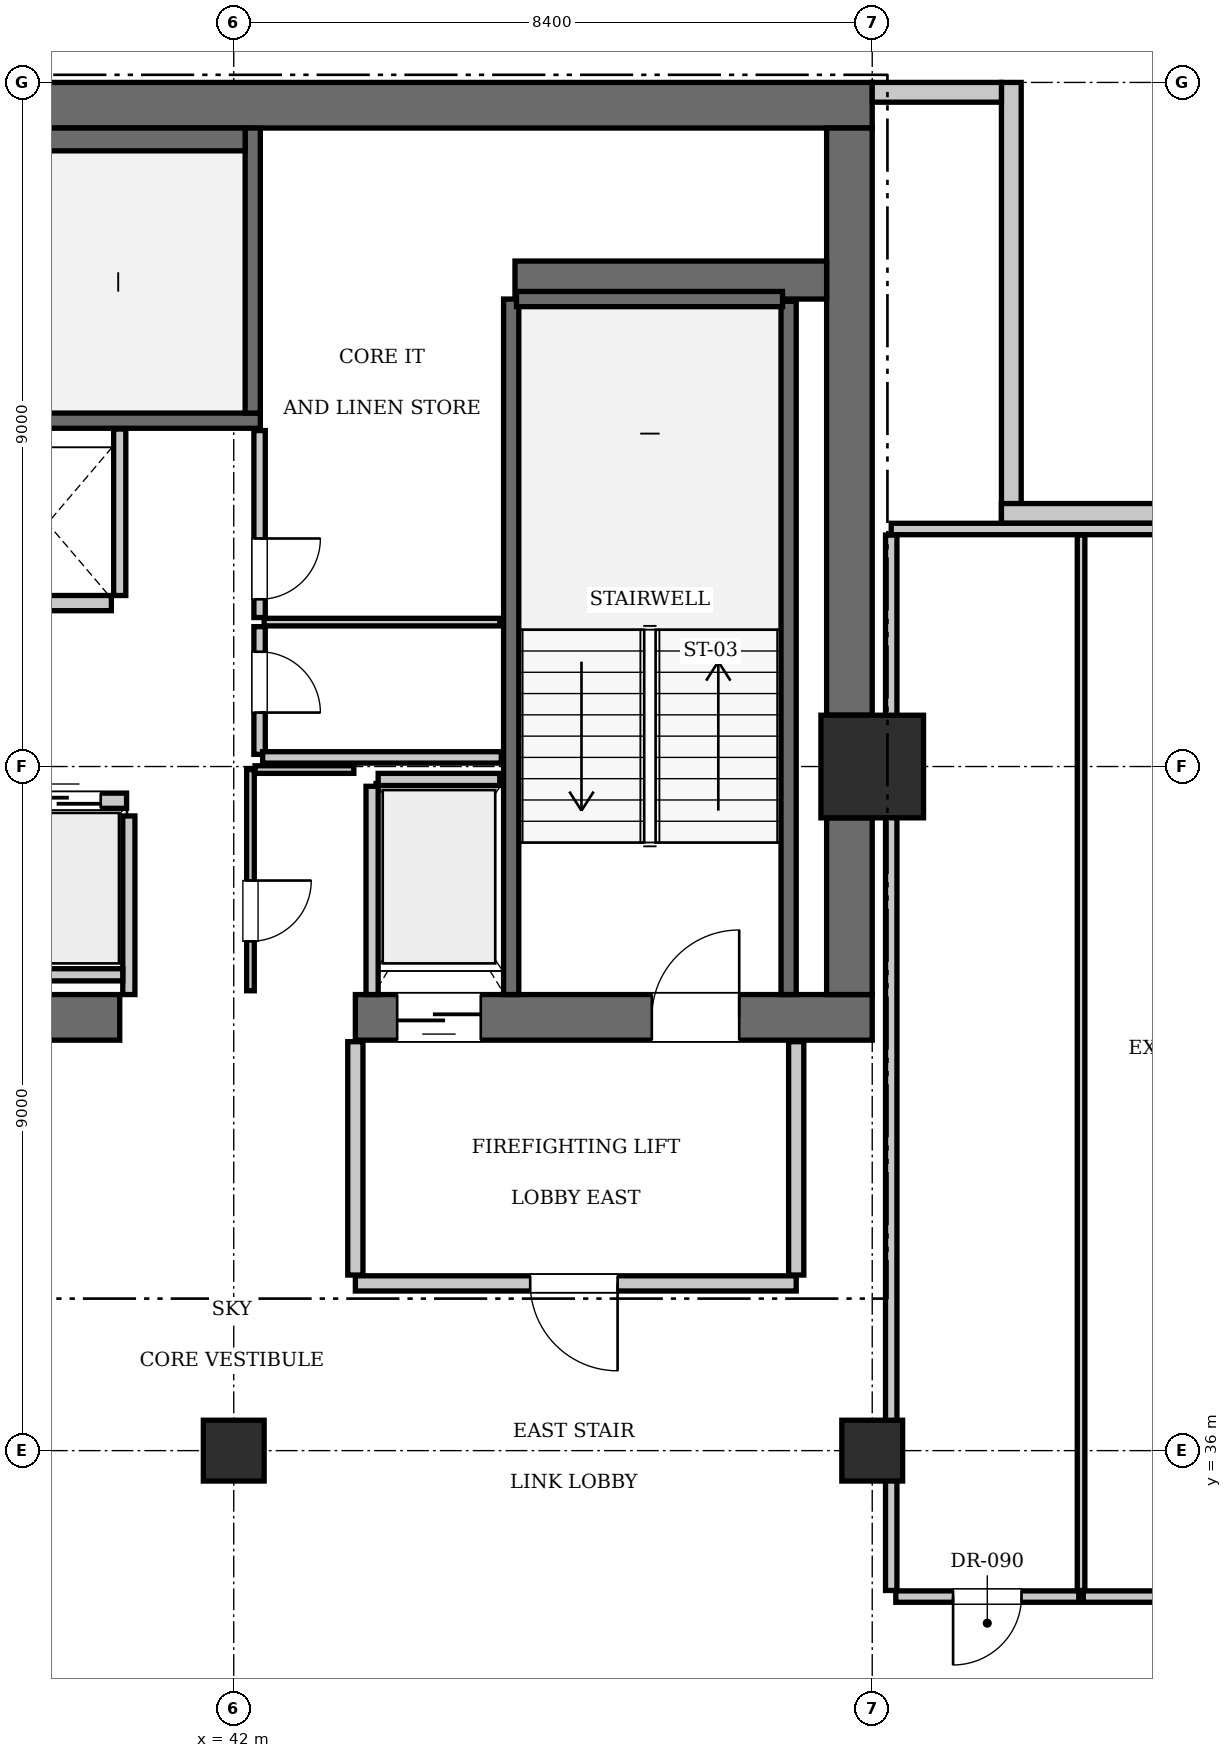
"""IFC4 building model, lengths in metres.
Left out: names, types, materials, properties, quantities, classifications, styles, units other than length and angle.
Written with IfcOpenShell. Run it as: python <this file> out.ifc"""

import sys

from ifc_helpers import new_model, si_unit, direction, frame, frame_2d, origin, origin_2d, place, context, subcontext, project, spatial, rectangle, extrude, element, fill, save


model = new_model("IFC4")
c1 = context("Model", 3, precision=1e-05, world=origin(), true_north=direction((0.0, 1.0)))
c2 = subcontext(c1, "Body", "Model", "MODEL_VIEW")
j1 = project(units=[si_unit("LENGTHUNIT", "METRE"), si_unit("PLANEANGLEUNIT", "RADIAN")], contexts=[c1])
p1 = place(None, origin())
s1 = spatial("IfcSite", under=j1, at=p1, CompositionType="ELEMENT")
p2 = place(p1, origin())
s2 = spatial("IfcBuilding", under=s1, at=p2, CompositionType="ELEMENT")
p3 = place(p2, frame((0.0, 0.0, 333.55)))
s3 = spatial("IfcBuildingStorey", under=s2, at=p3, CompositionType="ELEMENT", Elevation=333.55)
p4 = place(p3, frame((50.4, 45.0, 0.0), z_axis=(0.0, 0.0, 1.0), x_axis=(1.0, 0.0, 0.0)))
e1 = element("IfcColumn", 1, at=p4, inside=s3, PredefinedType="COLUMN", context=c2, shape_type="SweptSolid", body=[
    extrude(rectangle(XDim=1.35, YDim=1.35, at=origin_2d()), origin(), (0.0, 0.0, 1.0), 3.85),
])
p5 = place(p3, frame((25.2, 53.7, 0.0), z_axis=(0.0, 0.0, 1.0), x_axis=(1.0, 0.0, 0.0)))
e2 = element("IfcWall", 2, at=p5, inside=s3, PredefinedType="SHEAR", context=c2, shape_type="SweptSolid", body=[
    extrude(rectangle(XDim=25.2, YDim=0.6, at=frame_2d((12.6, 0.0))), origin(), (0.0, 0.0, 1.0), 3.85),
])
p6 = place(p3, frame((35.1, 41.7, 0.0), z_axis=(0.0, 0.0, 1.0), x_axis=(1.0, 0.0, 0.0)))
e3 = element("IfcWall", 3, at=p6, inside=s3, PredefinedType="SHEAR", context=c2, shape_type="SweptSolid", body=[
    extrude(rectangle(XDim=5.4, YDim=0.6, at=frame_2d((2.7, 0.0))), origin(), (0.0, 0.0, 1.0), 3.85),
])
p7 = place(p3, frame((43.6, 41.7, 0.0), z_axis=(0.0, 0.0, 1.0), x_axis=(1.0, 0.0, 0.0)))
e4 = element("IfcWall", 4, at=p7, inside=s3, PredefinedType="SHEAR", context=c2, shape_type="SweptSolid", body=[
    extrude(rectangle(XDim=6.8, YDim=0.6, at=frame_2d((3.4, 0.0))), origin(), (0.0, 0.0, 1.0), 3.85),
])
p8 = place(p7, frame((3.9, 0.0, 0.0)))
e5 = element("IfcOpeningElement", 5, at=p8, cuts=e4, PredefinedType="OPENING", context=c2, shape_type="SweptSolid", body=[
    extrude(rectangle(XDim=1.15, YDim=2.15, at=frame_2d((0.575, 1.075))), frame((0.0, 0.31, 0.0), z_axis=(0.0, -1.0, 0.0), x_axis=(1.0, 0.0, 0.0)), (0.0, 0.0, 1.0), 0.62),
])
p9 = place(p7, frame((0.55, 0.0, 0.0)))
e6 = element("IfcOpeningElement", 6, at=p9, cuts=e4, PredefinedType="OPENING", context=c2, shape_type="SweptSolid", body=[
    extrude(rectangle(XDim=1.1, YDim=2.2, at=frame_2d((0.55, 1.1))), frame((0.0, 0.31, 0.0), z_axis=(0.0, -1.0, 0.0), x_axis=(1.0, 0.0, 0.0)), (0.0, 0.0, 1.0), 0.62),
])
p10 = place(p3, frame((50.1, 42.0, 0.0), z_axis=(0.0, 0.0, 1.0), x_axis=(0.0, 1.0, 0.0)))
e7 = element("IfcWall", 7, at=p10, inside=s3, PredefinedType="SHEAR", context=c2, shape_type="SweptSolid", body=[
    extrude(rectangle(XDim=2.325, YDim=0.6, at=frame_2d((1.163, 0.0))), origin(), (0.0, 0.0, 1.0), 3.85),
])
p11 = place(p3, frame((50.1, 45.675, 0.0), z_axis=(0.0, 0.0, 1.0), x_axis=(0.0, 1.0, 0.0)))
e8 = element("IfcWall", 8, at=p11, inside=s3, PredefinedType="SHEAR", context=c2, shape_type="SweptSolid", body=[
    extrude(rectangle(XDim=7.725, YDim=0.6, at=frame_2d((3.862, 0.0))), origin(), (0.0, 0.0, 1.0), 3.85),
])
p12 = place(p3, frame((45.7, 51.4, 0.0), z_axis=(0.0, 0.0, 1.0), x_axis=(1.0, 0.0, 0.0)))
e9 = element("IfcWall", 9, at=p12, inside=s3, PredefinedType="SHEAR", context=c2, shape_type="SweptSolid", body=[
    extrude(rectangle(XDim=4.1, YDim=0.5, at=frame_2d((2.05, 0.0))), origin(), (0.0, 0.0, 1.0), 3.85),
])
for number, where, z_axis, x_axis in (
    (10, (42.0, 36.0, 0.0), (0.0, 0.0, 1.0), (1.0, 0.0, 0.0)),
    (11, (50.4, 36.0, 0.0), (0.0, 0.0, 1.0), (1.0, 0.0, 0.0)),
):
    element("IfcColumn", number, at=place(p3, frame(where, z_axis=z_axis, x_axis=x_axis)), inside=s3, PredefinedType="COLUMN", context=c2, shape_type="SweptSolid", body=[
        extrude(rectangle(XDim=0.8, YDim=0.8, at=origin_2d()), origin(), (0.0, 0.0, 1.0), 3.85),
    ])
p13 = place(p3, frame((33.25, 49.55, 0.0), z_axis=(0.0, 0.0, 1.0), x_axis=(1.0, 0.0, 0.0)))
e12 = element("IfcWall", 12, at=p13, inside=s3, PredefinedType="SOLIDWALL", context=c2, shape_type="SweptSolid", body=[
    extrude(rectangle(XDim=9.1, YDim=0.2, at=frame_2d((4.55, 0.0))), origin(), (0.0, 0.0, 1.0), 3.61),
])
p14 = place(p3, frame((42.25, 49.65, 0.0), z_axis=(0.0, 0.0, 1.0), x_axis=(0.0, 1.0, 0.0)))
e13 = element("IfcWall", 13, at=p14, inside=s3, PredefinedType="SOLIDWALL", context=c2, shape_type="SweptSolid", body=[
    extrude(rectangle(XDim=3.75, YDim=0.2, at=frame_2d((1.875, 0.0))), origin(), (0.0, 0.0, 1.0), 3.61),
])
p15 = place(p3, frame((33.45, 53.25, 0.0), z_axis=(0.0, 0.0, 1.0), x_axis=(1.0, 0.0, 0.0)))
e14 = element("IfcWall", 14, at=p15, inside=s3, PredefinedType="SOLIDWALL", context=c2, shape_type="SweptSolid", body=[
    extrude(rectangle(XDim=8.7, YDim=0.3, at=frame_2d((4.35, 0.0))), origin(), (0.0, 0.0, 1.0), 3.61),
])
p16 = place(p3, frame((45.65, 42.0, 0.0), z_axis=(0.0, 0.0, 1.0), x_axis=(0.0, 1.0, 0.0)))
e15 = element("IfcWall", 15, at=p16, inside=s3, PredefinedType="SOLIDWALL", context=c2, shape_type="SweptSolid", body=[
    extrude(rectangle(XDim=9.15, YDim=0.2, at=frame_2d((4.575, 0.0))), origin(), (0.0, 0.0, 1.0), 3.61),
])
p17 = place(p3, frame((49.3, 42.0, 0.0), z_axis=(0.0, 0.0, 1.0), x_axis=(0.0, 1.0, 0.0)))
e16 = element("IfcWall", 16, at=p17, inside=s3, PredefinedType="SOLIDWALL", context=c2, shape_type="SweptSolid", body=[
    extrude(rectangle(XDim=9.12, YDim=0.2, at=frame_2d((4.56, 0.0))), origin(), (0.0, 0.0, 1.0), 3.61),
])
p18 = place(p3, frame((45.72, 51.15, 0.0), z_axis=(0.0, 0.0, 1.0), x_axis=(1.0, 0.0, 0.0)))
e17 = element("IfcWall", 17, at=p18, inside=s3, PredefinedType="SOLIDWALL", context=c2, shape_type="SweptSolid", body=[
    extrude(rectangle(XDim=3.5, YDim=0.2, at=frame_2d((1.75, 0.0))), origin(), (0.0, 0.0, 1.0), 3.61),
])
p19 = place(p3, frame((38.91, 44.55, 0.0), z_axis=(0.0, 0.0, 1.0), x_axis=(1.0, 0.0, 0.0)))
e18 = element("IfcWall", 18, at=p19, inside=s3, PredefinedType="SOLIDWALL", context=c2, shape_type="SweptSolid", body=[
    extrude(rectangle(XDim=1.68, YDim=0.2, at=frame_2d((0.84, 0.0))), origin(), (0.0, 0.0, 1.0), 3.61),
])
p20 = place(p19, frame((0.34, 0.0, 0.0)))
e19 = element("IfcOpeningElement", 19, at=p20, cuts=e18, PredefinedType="OPENING", context=c2, shape_type="SweptSolid", body=[
    extrude(rectangle(XDim=1.0, YDim=2.15, at=frame_2d((0.5, 1.075))), frame((0.0, 0.11, 0.0), z_axis=(0.0, -1.0, 0.0), x_axis=(1.0, 0.0, 0.0)), (0.0, 0.0, 1.0), 0.22),
])
p21 = place(p3, frame((38.71, 47.15, 0.0), z_axis=(0.0, 0.0, 1.0), x_axis=(1.0, 0.0, 0.0)))
e20 = element("IfcWall", 20, at=p21, inside=s3, PredefinedType="SOLIDWALL", context=c2, shape_type="SweptSolid", body=[
    extrude(rectangle(XDim=1.68, YDim=0.2, at=frame_2d((0.84, 0.0))), origin(), (0.0, 0.0, 1.0), 3.61),
])
p22 = place(p3, frame((43.9, 44.83, 0.0), z_axis=(0.0, 0.0, 1.0), x_axis=(1.0, 0.0, 0.0)))
e21 = element("IfcWall", 21, at=p22, inside=s3, PredefinedType="SOLIDWALL", context=c2, shape_type="SweptSolid", body=[
    extrude(rectangle(XDim=1.6, YDim=0.16, at=frame_2d((0.8, 0.0))), origin(), (0.0, 0.0, 1.0), 3.61),
])
p23 = place(p3, frame((43.82, 42.0, 0.0), z_axis=(0.0, 0.0, 1.0), x_axis=(0.0, 1.0, 0.0)))
e22 = element("IfcWall", 22, at=p23, inside=s3, PredefinedType="SOLIDWALL", context=c2, shape_type="SweptSolid", body=[
    extrude(rectangle(XDim=2.74, YDim=0.16, at=frame_2d((1.37, 0.0))), origin(), (0.0, 0.0, 1.0), 3.61),
])
p24 = place(p3, frame((40.62, 42.0, 0.0), z_axis=(0.0, 0.0, 1.0), x_axis=(0.0, 1.0, 0.0)))
e23 = element("IfcWall", 23, at=p24, inside=s3, PredefinedType="SOLIDWALL", context=c2, shape_type="SweptSolid", body=[
    extrude(rectangle(XDim=2.35, YDim=0.16, at=frame_2d((1.175, 0.0))), origin(), (0.0, 0.0, 1.0), 3.61),
])
p25 = place(p3, frame((35.52, 42.26, 0.0), z_axis=(0.0, 0.0, 1.0), x_axis=(1.0, 0.0, 0.0)))
e24 = element("IfcWall", 24, at=p25, inside=s3, PredefinedType="SOLIDWALL", context=c2, shape_type="SweptSolid", body=[
    extrude(rectangle(XDim=5.02, YDim=0.16, at=frame_2d((2.51, 0.0))), origin(), (0.0, 0.0, 1.0), 3.61),
])
p26 = place(p3, frame((40.5, 47.25, 0.0), z_axis=(0.0, 0.0, 1.0), x_axis=(0.0, 1.0, 0.0)))
e25 = element("IfcWall", 25, at=p26, inside=s3, PredefinedType="SOLIDWALL", context=c2, shape_type="SweptSolid", body=[
    extrude(rectangle(XDim=2.19, YDim=0.16, at=frame_2d((1.095, 0.0))), origin(), (0.0, 0.0, 1.0), 3.61),
])
p27 = place(p3, frame((52.23, 54.0, 0.0), z_axis=(0.0, 0.0, 1.0), x_axis=(0.0, -1.0, 0.0)))
e26 = element("IfcWall", 26, at=p27, inside=s3, PredefinedType="SOLIDWALL", context=c2, shape_type="SweptSolid", body=[
    extrude(rectangle(XDim=5.8, YDim=0.26, at=frame_2d((2.9, 0.0))), origin(), (0.0, 0.0, 1.0), 3.61),
])
p28 = place(p3, frame((52.1, 48.33, 0.0), z_axis=(0.0, 0.0, 1.0), x_axis=(1.0, 0.0, 0.0)))
e27 = element("IfcWall", 27, at=p28, inside=s3, PredefinedType="SOLIDWALL", context=c2, shape_type="SweptSolid", body=[
    extrude(rectangle(XDim=5.8, YDim=0.26, at=frame_2d((2.9, 0.0))), origin(), (0.0, 0.0, 1.0), 3.61),
])
p29 = place(p3, frame((52.1, 53.87, 0.0), z_axis=(0.0, 0.0, 1.0), x_axis=(-1.0, 0.0, 0.0)))
e28 = element("IfcWall", 28, at=p29, inside=s3, PredefinedType="SOLIDWALL", context=c2, shape_type="SweptSolid", body=[
    extrude(rectangle(XDim=1.7, YDim=0.26, at=frame_2d((0.85, 0.0))), origin(), (0.0, 0.0, 1.0), 3.61),
])
p30 = place(p3, frame((43.6, 38.2, 0.0), z_axis=(0.0, 0.0, 1.0), x_axis=(1.0, 0.0, 0.0)))
e29 = element("IfcWall", 29, at=p30, inside=s3, PredefinedType="PARTITIONING", context=c2, shape_type="SweptSolid", body=[
    extrude(rectangle(XDim=5.8, YDim=0.2, at=frame_2d((2.9, 0.0))), origin(), (0.0, 0.0, 1.0), 3.61),
])
p31 = place(p30, frame((2.3, 0.0, 0.0)))
e30 = element("IfcOpeningElement", 30, at=p31, cuts=e29, PredefinedType="OPENING", context=c2, shape_type="SweptSolid", body=[
    extrude(rectangle(XDim=1.15, YDim=2.15, at=frame_2d((0.575, 1.075))), frame((0.0, 0.11, 0.0), z_axis=(0.0, -1.0, 0.0), x_axis=(1.0, 0.0, 0.0)), (0.0, 0.0, 1.0), 0.22),
])
for number, where, z_axis, x_axis in (
    (31, (43.6, 38.31, 0.0), (0.0, 0.0, 1.0), (0.0, 1.0, 0.0)),
    (32, (49.4, 38.31, 0.0), (0.0, 0.0, 1.0), (0.0, 1.0, 0.0)),
):
    element("IfcWall", number, at=place(p3, frame(where, z_axis=z_axis, x_axis=x_axis)), inside=s3, PredefinedType="PARTITIONING", context=c2, shape_type="SweptSolid", body=[
        extrude(rectangle(XDim=3.07, YDim=0.2, at=frame_2d((1.535, 0.0))), origin(), (0.0, 0.0, 1.0), 3.61),
    ])
p32 = place(p3, frame((42.22, 42.05, 0.0), z_axis=(0.0, 0.0, 1.0), x_axis=(0.0, 1.0, 0.0)))
e33 = element("IfcWall", 33, at=p32, inside=s3, PredefinedType="PARTITIONING", context=c2, shape_type="SweptSolid", body=[
    extrude(rectangle(XDim=2.91, YDim=0.1, at=frame_2d((1.455, 0.0))), origin(), (0.0, 0.0, 1.0), 3.61),
])
p33 = place(p32, frame((0.65, 0.0, 0.0)))
e34 = element("IfcOpeningElement", 34, at=p33, cuts=e33, PredefinedType="OPENING", context=c2, shape_type="SweptSolid", body=[
    extrude(rectangle(XDim=0.8, YDim=2.05, at=frame_2d((0.4, 1.025))), frame((0.0, 0.06, 0.0), z_axis=(0.0, -1.0, 0.0), x_axis=(1.0, 0.0, 0.0)), (0.0, 0.0, 1.0), 0.12),
])
p34 = place(p3, frame((42.28, 44.96, 0.0), z_axis=(0.0, 0.0, 1.0), x_axis=(1.0, 0.0, 0.0)))
e35 = element("IfcWall", 35, at=p34, inside=s3, PredefinedType="PARTITIONING", context=c2, shape_type="SweptSolid", body=[
    extrude(rectangle(XDim=1.3, YDim=0.1, at=frame_2d((0.65, 0.0))), origin(), (0.0, 0.0, 1.0), 3.61),
])
p35 = place(p3, frame((42.34, 45.16, 0.0), z_axis=(0.0, 0.0, 1.0), x_axis=(0.0, 1.0, 0.0)))
e36 = element("IfcWall", 36, at=p35, inside=s3, PredefinedType="PARTITIONING", context=c2, shape_type="SweptSolid", body=[
    extrude(rectangle(XDim=1.68, YDim=0.15, at=frame_2d((0.84, 0.0))), origin(), (0.0, 0.0, 1.0), 3.61),
])
p36 = place(p35, frame((0.55, 0.0, 0.0)))
e37 = element("IfcOpeningElement", 37, at=p36, cuts=e36, PredefinedType="OPENING", context=c2, shape_type="SweptSolid", body=[
    extrude(rectangle(XDim=0.8, YDim=2.05, at=frame_2d((0.4, 1.025))), frame((0.0, 0.085, 0.0), z_axis=(0.0, -1.0, 0.0), x_axis=(1.0, 0.0, 0.0)), (0.0, 0.0, 1.0), 0.17),
])
p37 = place(p3, frame((42.34, 46.96, 0.0), z_axis=(0.0, 0.0, 1.0), x_axis=(0.0, 1.0, 0.0)))
e38 = element("IfcWall", 38, at=p37, inside=s3, PredefinedType="PARTITIONING", context=c2, shape_type="SweptSolid", body=[
    extrude(rectangle(XDim=2.46, YDim=0.15, at=frame_2d((1.23, 0.0))), origin(), (0.0, 0.0, 1.0), 3.61),
])
p38 = place(p37, frame((0.24, 0.0, 0.0)))
e39 = element("IfcOpeningElement", 39, at=p38, cuts=e38, PredefinedType="OPENING", context=c2, shape_type="SweptSolid", body=[
    extrude(rectangle(XDim=0.8, YDim=2.05, at=frame_2d((0.4, 1.025))), frame((0.0, 0.085, 0.0), z_axis=(0.0, -1.0, 0.0), x_axis=(1.0, 0.0, 0.0)), (0.0, 0.0, 1.0), 0.17),
])
p39 = place(p3, frame((42.4, 46.9, 0.0), z_axis=(0.0, 0.0, 1.0), x_axis=(1.0, 0.0, 0.0)))
e40 = element("IfcWall", 40, at=p39, inside=s3, PredefinedType="PARTITIONING", context=c2, shape_type="SweptSolid", body=[
    extrude(rectangle(XDim=3.1, YDim=0.1, at=frame_2d((1.55, 0.0))), origin(), (0.0, 0.0, 1.0), 3.61),
])
p40 = place(p3, frame((42.38, 45.12, 0.0), z_axis=(0.0, 0.0, 1.0), x_axis=(1.0, 0.0, 0.0)))
e41 = element("IfcWall", 41, at=p40, inside=s3, PredefinedType="PARTITIONING", context=c2, shape_type="SweptSolid", body=[
    extrude(rectangle(XDim=3.14, YDim=0.15, at=frame_2d((1.57, 0.0))), origin(), (0.0, 0.0, 1.0), 3.61),
])
p41 = place(p3, frame((50.65, 48.125, 0.0), z_axis=(0.0, 0.0, 1.0), x_axis=(1.0, 0.0, 0.0)))
e42 = element("IfcWall", 42, at=p41, inside=s3, PredefinedType="PARTITIONING", context=c2, shape_type="SweptSolid", body=[
    extrude(rectangle(XDim=6.75, YDim=0.15, at=frame_2d((3.375, 0.0))), origin(), (0.0, 0.0, 1.0), 3.61),
])
p42 = place(p3, frame((50.65, 34.16, 0.0), z_axis=(0.0, 0.0, 1.0), x_axis=(0.0, 1.0, 0.0)))
e43 = element("IfcWall", 43, at=p42, inside=s3, PredefinedType="PARTITIONING", context=c2, shape_type="SweptSolid", body=[
    extrude(rectangle(XDim=13.885, YDim=0.15, at=frame_2d((6.942, 0.0))), origin(), (0.0, 0.0, 1.0), 3.61),
])
p43 = place(p3, frame((50.71, 34.08, 0.0), z_axis=(0.0, 0.0, 1.0), x_axis=(1.0, 0.0, 0.0)))
e44 = element("IfcWall", 44, at=p43, inside=s3, PredefinedType="PARTITIONING", context=c2, shape_type="SweptSolid", body=[
    extrude(rectangle(XDim=2.407, YDim=0.15, at=frame_2d((1.204, 0.0))), origin(), (0.0, 0.0, 1.0), 3.61),
])
p44 = place(p43, frame((0.754, 0.0, 0.0)))
e45 = element("IfcOpeningElement", 45, at=p44, cuts=e44, PredefinedType="OPENING", context=c2, shape_type="SweptSolid", body=[
    extrude(rectangle(XDim=0.9, YDim=2.1, at=frame_2d((0.45, 1.05))), frame((0.0, 0.085, 0.0), z_axis=(0.0, -1.0, 0.0), x_axis=(1.0, 0.0, 0.0)), (0.0, 0.0, 1.0), 0.17),
])
p45 = place(p3, frame((53.147, 34.16, 0.0), z_axis=(0.0, 0.0, 1.0), x_axis=(0.0, 1.0, 0.0)))
e46 = element("IfcWall", 46, at=p45, inside=s3, PredefinedType="PARTITIONING", context=c2, shape_type="SweptSolid", body=[
    extrude(rectangle(XDim=13.885, YDim=0.1, at=frame_2d((6.942, 0.0))), origin(), (0.0, 0.0, 1.0), 3.61),
])
p46 = place(p3, frame((53.177, 34.08, 0.0), z_axis=(0.0, 0.0, 1.0), x_axis=(1.0, 0.0, 0.0)))
e47 = element("IfcWall", 47, at=p46, inside=s3, PredefinedType="PARTITIONING", context=c2, shape_type="SweptSolid", body=[
    extrude(rectangle(XDim=4.163, YDim=0.15, at=frame_2d((2.081, 0.0))), origin(), (0.0, 0.0, 1.0), 3.61),
])
p47 = place(p46, frame((1.631, 0.0, 0.0)))
e48 = element("IfcOpeningElement", 48, at=p47, cuts=e47, PredefinedType="OPENING", context=c2, shape_type="SweptSolid", body=[
    extrude(rectangle(XDim=0.9, YDim=2.1, at=frame_2d((0.45, 1.05))), frame((0.0, 0.085, 0.0), z_axis=(0.0, -1.0, 0.0), x_axis=(1.0, 0.0, 0.0)), (0.0, 0.0, 1.0), 0.17),
])
p48 = place(p8, origin())
e49 = element("IfcDoor", 49, at=p48, inside=s3, OperationType="SINGLE_SWING_RIGHT", PredefinedType="DOOR", context=c2, shape_type="SweptSolid", body=[
    extrude(rectangle(XDim=1.15, YDim=2.15, at=frame_2d((0.575, 1.075))), frame((0.0, 0.025, 0.0), z_axis=(0.0, -1.0, 0.0), x_axis=(1.0, 0.0, 0.0)), (0.0, 0.0, 1.0), 0.05),
])
fill(e5, e49)
p49 = place(p20, origin())
e50 = element("IfcDoor", 50, at=p49, inside=s3, OperationType="SLIDING_TO_LEFT", PredefinedType="DOOR", context=c2, shape_type="SweptSolid", body=[
    extrude(rectangle(XDim=1.0, YDim=2.15, at=frame_2d((0.5, 1.075))), frame((0.0, 0.025, 0.0), z_axis=(0.0, -1.0, 0.0), x_axis=(1.0, 0.0, 0.0)), (0.0, 0.0, 1.0), 0.05),
])
fill(e19, e50)
p50 = place(p9, frame((1.1, 0.0, 0.0), z_axis=(0.0, 0.0, 1.0), x_axis=(-1.0, 0.0, 0.0)))
e51 = element("IfcDoor", 51, at=p50, inside=s3, OperationType="SLIDING_TO_LEFT", PredefinedType="DOOR", context=c2, shape_type="SweptSolid", body=[
    extrude(rectangle(XDim=1.1, YDim=2.2, at=frame_2d((0.55, 1.1))), frame((0.0, 0.025, 0.0), z_axis=(0.0, -1.0, 0.0), x_axis=(1.0, 0.0, 0.0)), (0.0, 0.0, 1.0), 0.05),
])
fill(e6, e51)
p51 = place(p31, frame((1.15, 0.0, 0.0), z_axis=(0.0, 0.0, 1.0), x_axis=(-1.0, 0.0, 0.0)))
e52 = element("IfcDoor", 52, at=p51, inside=s3, OperationType="SINGLE_SWING_LEFT", PredefinedType="DOOR", context=c2, shape_type="SweptSolid", body=[
    extrude(rectangle(XDim=1.15, YDim=2.15, at=frame_2d((0.575, 1.075))), frame((0.0, 0.025, 0.0), z_axis=(0.0, -1.0, 0.0), x_axis=(1.0, 0.0, 0.0)), (0.0, 0.0, 1.0), 0.05),
])
fill(e30, e52)
p52 = place(p33, frame((0.8, 0.0, 0.0), z_axis=(0.0, 0.0, 1.0), x_axis=(-1.0, 0.0, 0.0)))
e53 = element("IfcDoor", 53, at=p52, inside=s3, OperationType="SINGLE_SWING_LEFT", PredefinedType="DOOR", context=c2, shape_type="SweptSolid", body=[
    extrude(rectangle(XDim=0.8, YDim=2.05, at=frame_2d((0.4, 1.025))), frame((0.0, 0.025, 0.0), z_axis=(0.0, -1.0, 0.0), x_axis=(1.0, 0.0, 0.0)), (0.0, 0.0, 1.0), 0.05),
])
fill(e34, e53)
p53 = place(p36, frame((0.8, 0.0, 0.0), z_axis=(0.0, 0.0, 1.0), x_axis=(-1.0, 0.0, 0.0)))
e54 = element("IfcDoor", 54, at=p53, inside=s3, OperationType="SINGLE_SWING_RIGHT", PredefinedType="DOOR", context=c2, shape_type="SweptSolid", body=[
    extrude(rectangle(XDim=0.8, YDim=2.05, at=frame_2d((0.4, 1.025))), frame((0.0, 0.025, 0.0), z_axis=(0.0, -1.0, 0.0), x_axis=(1.0, 0.0, 0.0)), (0.0, 0.0, 1.0), 0.05),
])
fill(e37, e54)
p54 = place(p38, frame((0.8, 0.0, 0.0), z_axis=(0.0, 0.0, 1.0), x_axis=(-1.0, 0.0, 0.0)))
e55 = element("IfcDoor", 55, at=p54, inside=s3, OperationType="SINGLE_SWING_LEFT", PredefinedType="DOOR", context=c2, shape_type="SweptSolid", body=[
    extrude(rectangle(XDim=0.8, YDim=2.05, at=frame_2d((0.4, 1.025))), frame((0.0, 0.025, 0.0), z_axis=(0.0, -1.0, 0.0), x_axis=(1.0, 0.0, 0.0)), (0.0, 0.0, 1.0), 0.05),
])
fill(e39, e55)
p55 = place(p44, frame((0.9, 0.0, 0.0), z_axis=(0.0, 0.0, 1.0), x_axis=(-1.0, 0.0, 0.0)))
e56 = element("IfcDoor", 56, at=p55, inside=s3, OperationType="SINGLE_SWING_RIGHT", PredefinedType="DOOR", context=c2, shape_type="SweptSolid", body=[
    extrude(rectangle(XDim=0.9, YDim=2.1, at=frame_2d((0.45, 1.05))), frame((0.0, 0.025, 0.0), z_axis=(0.0, -1.0, 0.0), x_axis=(1.0, 0.0, 0.0)), (0.0, 0.0, 1.0), 0.05),
])
fill(e45, e56)
save(model, sys.argv[1])
